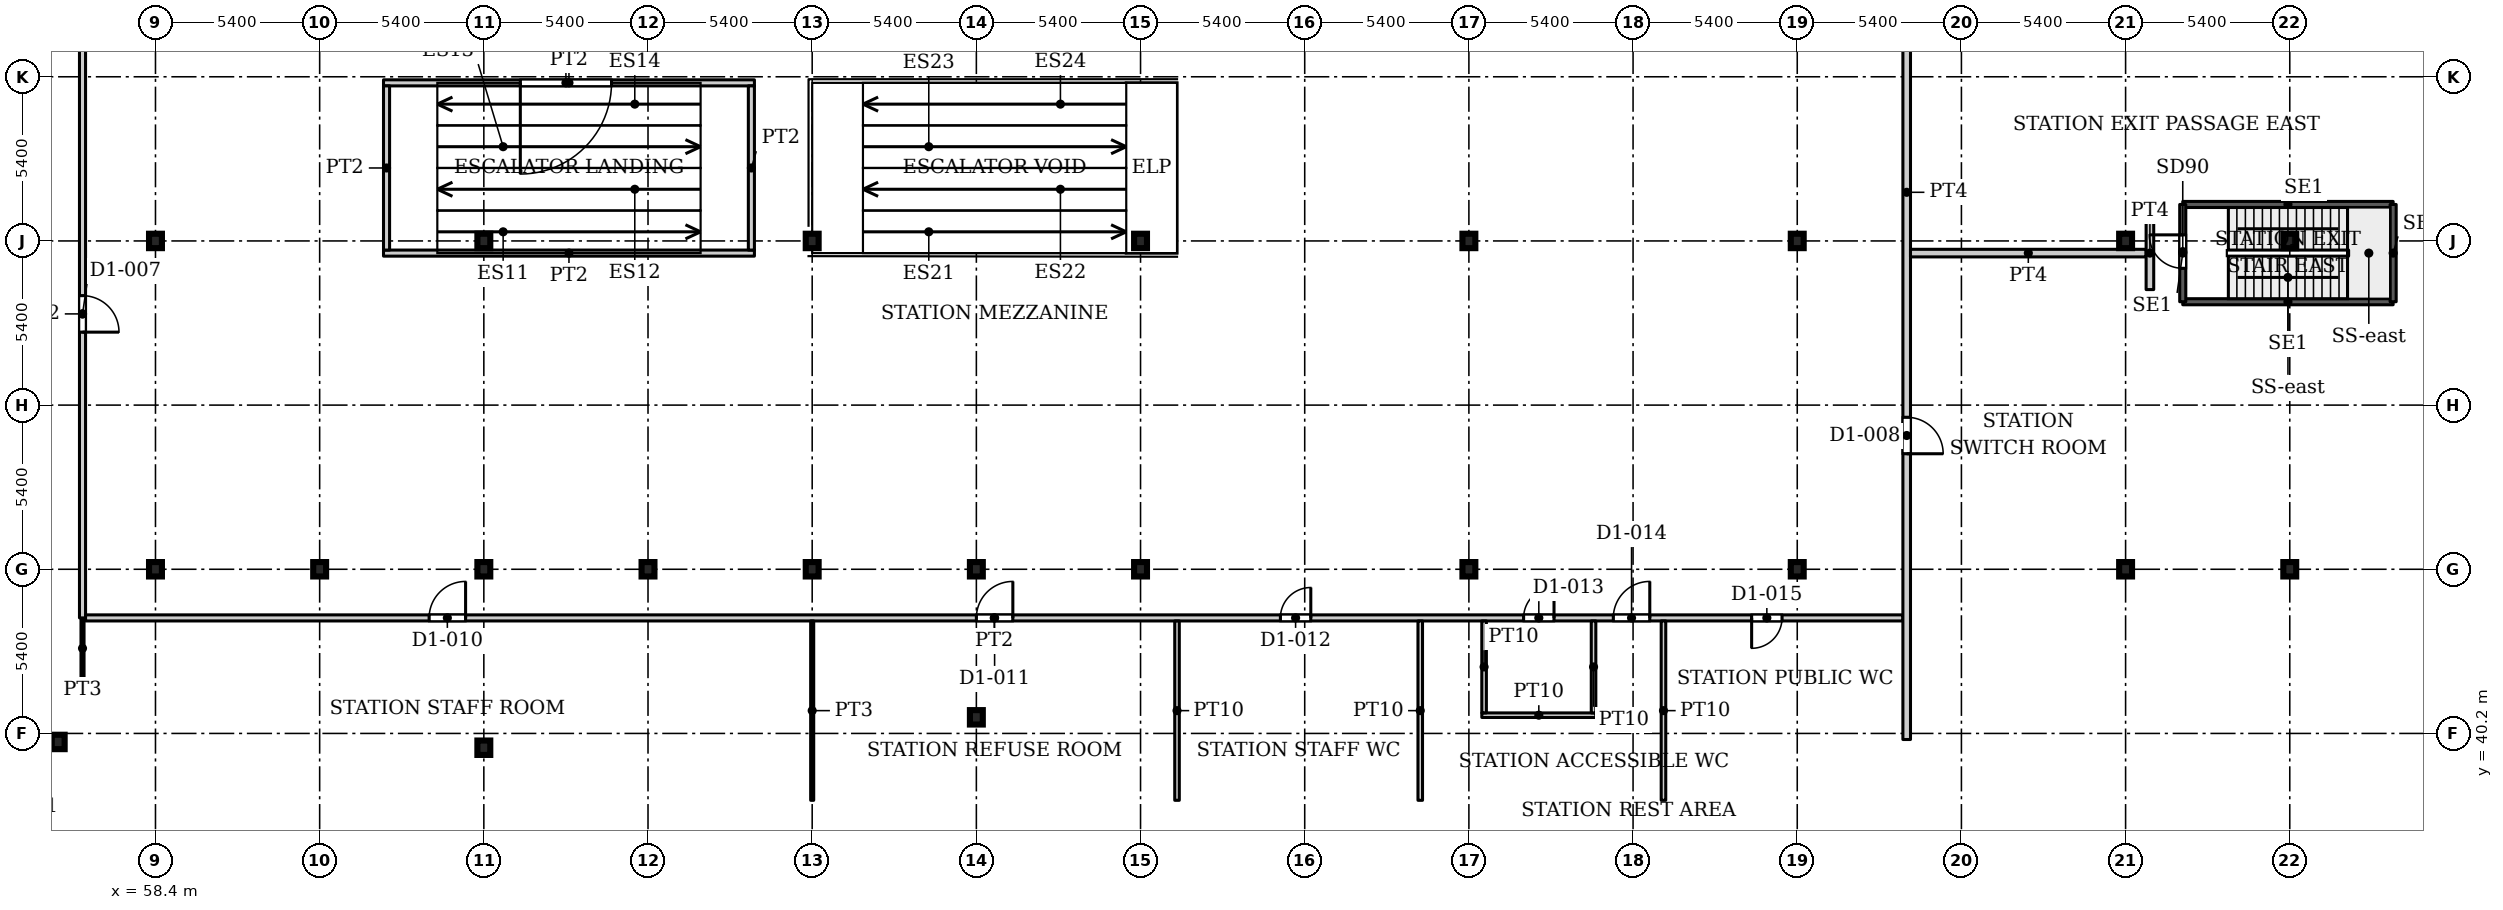
"""IFC4 building model, lengths in metres.
Left out: names, types, materials, properties, quantities, classifications, styles, units other than length and angle.
Written with IfcOpenShell. Run it as: python <this file> out.ifc"""

import sys

from ifc_helpers import new_model, si_unit, direction, frame, frame_2d, origin, origin_2d, place, context, subcontext, project, spatial, rectangle, i_section, extrude, source, transform, mapped, element, fill, save


model = new_model("IFC4")
c1 = context("Model", 3, precision=1e-05, world=origin(), true_north=direction((0.0, 1.0)))
c2 = subcontext(c1, "Body", "Model", "MODEL_VIEW")
j1 = project(units=[si_unit("LENGTHUNIT", "METRE"), si_unit("PLANEANGLEUNIT", "RADIAN")], contexts=[c1])
p1 = place(None, origin())
s1 = spatial("IfcSite", under=j1, at=p1, CompositionType="ELEMENT")
p2 = place(p1, origin())
s2 = spatial("IfcBuilding", under=s1, at=p2, CompositionType="ELEMENT")
p3 = place(p2, frame((0.0, 0.0, -5.0)))
s3 = spatial("IfcBuildingStorey", under=s2, at=p3, CompositionType="ELEMENT", Elevation=-5.0)
for number, where, z_axis, x_axis in (
    (1, (58.4, 45.6, 0.0), (0.0, 0.0, 1.0), (1.0, 0.0, 0.0)),
    (2, (69.2, 45.6, 0.0), (0.0, 0.0, 1.0), (1.0, 0.0, 0.0)),
    (3, (80.0, 45.6, 0.0), (0.0, 0.0, 1.0), (1.0, 0.0, 0.0)),
    (4, (90.8, 45.6, 0.0), (0.0, 0.0, 1.0), (1.0, 0.0, 0.0)),
    (5, (101.6, 45.6, 0.0), (0.0, 0.0, 1.0), (1.0, 0.0, 0.0)),
    (6, (112.4, 45.6, 0.0), (0.0, 0.0, 1.0), (1.0, 0.0, 0.0)),
    (7, (123.2, 45.6, 0.0), (0.0, 0.0, 1.0), (1.0, 0.0, 0.0)),
    (8, (128.6, 45.6, 0.0), (0.0, 0.0, 1.0), (1.0, 0.0, 0.0)),
    (9, (58.4, 56.4, 0.0), (0.0, 0.0, 1.0), (1.0, 0.0, 0.0)),
    (10, (69.2, 56.4, 0.0), (0.0, 0.0, 1.0), (1.0, 0.0, 0.0)),
    (11, (80.0, 56.4, 0.0), (0.0, 0.0, 1.0), (1.0, 0.0, 0.0)),
    (12, (90.8, 56.4, 0.0), (0.0, 0.0, 1.0), (1.0, 0.0, 0.0)),
    (13, (101.6, 56.4, 0.0), (0.0, 0.0, 1.0), (1.0, 0.0, 0.0)),
    (14, (112.4, 56.4, 0.0), (0.0, 0.0, 1.0), (1.0, 0.0, 0.0)),
    (15, (123.2, 56.4, 0.0), (0.0, 0.0, 1.0), (1.0, 0.0, 0.0)),
    (16, (128.6, 56.4, 0.0), (0.0, 0.0, 1.0), (1.0, 0.0, 0.0)),
    (17, (63.8, 45.6, 0.0), (0.0, 0.0, 1.0), (1.0, 0.0, 0.0)),
    (18, (74.6, 45.6, 0.0), (0.0, 0.0, 1.0), (1.0, 0.0, 0.0)),
    (19, (85.4, 45.6, 0.0), (0.0, 0.0, 1.0), (1.0, 0.0, 0.0)),
    (20, (69.2, 39.73, 0.0), (0.0, 0.0, 1.0), (1.0, 0.0, 0.0)),
    (21, (55.2, 39.92, 0.0), (0.0, 0.0, 1.0), (1.0, 0.0, 0.0)),
    (22, (85.4, 40.73, 0.0), (0.0, 0.0, 1.0), (1.0, 0.0, 0.0)),
):
    element("IfcColumn", number, at=place(p3, frame(where, z_axis=z_axis, x_axis=x_axis)), inside=s3, PredefinedType="COLUMN", context=c2, shape_type="SweptSolid", body=[
        extrude(i_section(OverallWidth=0.424, OverallDepth=0.474, WebThickness=0.048, FlangeThickness=0.077, FilletRadius=0.014, at=origin_2d()), origin(), (0.0, 0.0, 1.0), 5.0),
    ])
for number, where, z_axis, x_axis in (
    (23, (125.08, 54.4, 0.0), (0.0, 0.0, 1.0), (1.0, 0.0, 0.0)),
    (24, (125.08, 57.6, 0.0), (0.0, 0.0, 1.0), (1.0, 0.0, 0.0)),
):
    element("IfcWall", number, at=place(p3, frame(where, z_axis=z_axis, x_axis=x_axis)), inside=s3, PredefinedType="SHEAR", context=c2, shape_type="SweptSolid", body=[
        extrude(rectangle(XDim=6.92, YDim=0.2, at=frame_2d((3.46, 0.0))), origin(), (0.0, 0.0, 1.0), 5.0),
    ])
p4 = place(p3, frame((125.08, 54.4, 0.0), z_axis=(0.0, 0.0, 1.0), x_axis=(0.0, 1.0, 0.0)))
e25 = element("IfcWall", 25, at=p4, inside=s3, PredefinedType="SHEAR", context=c2, shape_type="SweptSolid", body=[
    extrude(rectangle(XDim=3.2, YDim=0.2, at=frame_2d((1.6, 0.0))), origin(), (0.0, 0.0, 1.0), 5.0),
])
p5 = place(p4, frame((1.1, 0.0, 0.0)))
e26 = element("IfcOpeningElement", 26, at=p5, cuts=e25, PredefinedType="OPENING", context=c2, shape_type="SweptSolid", body=[
    extrude(rectangle(XDim=1.1, YDim=2.2, at=frame_2d((0.55, 1.1))), frame((0.0, 0.11, 0.0), z_axis=(0.0, -1.0, 0.0), x_axis=(1.0, 0.0, 0.0)), (0.0, 0.0, 1.0), 0.22),
])
p6 = place(p3, frame((132.0, 54.4, 0.0), z_axis=(0.0, 0.0, 1.0), x_axis=(0.0, 1.0, 0.0)))
e27 = element("IfcWall", 27, at=p6, inside=s3, PredefinedType="SHEAR", context=c2, shape_type="SweptSolid", body=[
    extrude(rectangle(XDim=3.2, YDim=0.2, at=frame_2d((1.6, 0.0))), origin(), (0.0, 0.0, 1.0), 5.0),
])
p7 = place(p3, frame((56.0, 42.0, 0.0), z_axis=(0.0, 0.0, 1.0), x_axis=(0.0, 1.0, 0.0)))
e28 = element("IfcWall", 28, at=p7, inside=s3, PredefinedType="PARTITIONING", context=c2, shape_type="SweptSolid", body=[
    extrude(rectangle(XDim=2.0, YDim=0.1, at=frame_2d((1.0, 0.0))), origin(), (0.0, 0.0, 1.0), 4.58),
])
p8 = place(p3, frame((56.0, 44.0, 0.0), z_axis=(0.0, 0.0, 1.0), x_axis=(0.0, 1.0, 0.0)))
e29 = element("IfcWall", 29, at=p8, inside=s3, PredefinedType="PARTITIONING", context=c2, shape_type="SweptSolid", body=[
    extrude(rectangle(XDim=20.0, YDim=0.2, at=frame_2d((10.0, 0.0))), origin(), (0.0, 0.0, 1.0), 4.58),
])
p9 = place(p8, frame((9.4, 0.0, 0.0)))
e30 = element("IfcOpeningElement", 30, at=p9, cuts=e29, PredefinedType="OPENING", context=c2, shape_type="SweptSolid", body=[
    extrude(rectangle(XDim=1.2, YDim=2.1, at=frame_2d((0.6, 1.05))), frame((0.0, 0.11, 0.0), z_axis=(0.0, -1.0, 0.0), x_axis=(1.0, 0.0, 0.0)), (0.0, 0.0, 1.0), 0.22),
])
p10 = place(p3, frame((56.1, 44.0, 0.0), z_axis=(0.0, 0.0, 1.0), x_axis=(1.0, 0.0, 0.0)))
e31 = element("IfcWall", 31, at=p10, inside=s3, PredefinedType="PARTITIONING", context=c2, shape_type="SweptSolid", body=[
    extrude(rectangle(XDim=59.775, YDim=0.2, at=frame_2d((29.887, 0.0))), origin(), (0.0, 0.0, 1.0), 4.58),
])
p11 = place(p10, frame((11.3, 0.0, 0.0)))
e32 = element("IfcOpeningElement", 32, at=p11, cuts=e31, PredefinedType="OPENING", context=c2, shape_type="SweptSolid", body=[
    extrude(rectangle(XDim=1.2, YDim=2.1, at=frame_2d((0.6, 1.05))), frame((0.0, 0.11, 0.0), z_axis=(0.0, -1.0, 0.0), x_axis=(1.0, 0.0, 0.0)), (0.0, 0.0, 1.0), 0.22),
])
p12 = place(p10, frame((29.3, 0.0, 0.0)))
e33 = element("IfcOpeningElement", 33, at=p12, cuts=e31, PredefinedType="OPENING", context=c2, shape_type="SweptSolid", body=[
    extrude(rectangle(XDim=1.2, YDim=2.1, at=frame_2d((0.6, 1.05))), frame((0.0, 0.11, 0.0), z_axis=(0.0, -1.0, 0.0), x_axis=(1.0, 0.0, 0.0)), (0.0, 0.0, 1.0), 0.22),
])
p13 = place(p10, frame((39.3, 0.0, 0.0)))
e34 = element("IfcOpeningElement", 34, at=p13, cuts=e31, PredefinedType="OPENING", context=c2, shape_type="SweptSolid", body=[
    extrude(rectangle(XDim=1.0, YDim=2.1, at=frame_2d((0.5, 1.05))), frame((0.0, 0.11, 0.0), z_axis=(0.0, -1.0, 0.0), x_axis=(1.0, 0.0, 0.0)), (0.0, 0.0, 1.0), 0.22),
])
p14 = place(p10, frame((47.3, 0.0, 0.0)))
e35 = element("IfcOpeningElement", 35, at=p14, cuts=e31, PredefinedType="OPENING", context=c2, shape_type="SweptSolid", body=[
    extrude(rectangle(XDim=1.0, YDim=2.1, at=frame_2d((0.5, 1.05))), frame((0.0, 0.11, 0.0), z_axis=(0.0, -1.0, 0.0), x_axis=(1.0, 0.0, 0.0)), (0.0, 0.0, 1.0), 0.22),
])
p15 = place(p10, frame((50.25, 0.0, 0.0)))
e36 = element("IfcOpeningElement", 36, at=p15, cuts=e31, PredefinedType="OPENING", context=c2, shape_type="SweptSolid", body=[
    extrude(rectangle(XDim=1.2, YDim=2.1, at=frame_2d((0.6, 1.05))), frame((0.0, 0.11, 0.0), z_axis=(0.0, -1.0, 0.0), x_axis=(1.0, 0.0, 0.0)), (0.0, 0.0, 1.0), 0.22),
])
p16 = place(p10, frame((54.8, 0.0, 0.0)))
e37 = element("IfcOpeningElement", 37, at=p16, cuts=e31, PredefinedType="OPENING", context=c2, shape_type="SweptSolid", body=[
    extrude(rectangle(XDim=1.0, YDim=2.1, at=frame_2d((0.5, 1.05))), frame((0.0, 0.11, 0.0), z_axis=(0.0, -1.0, 0.0), x_axis=(1.0, 0.0, 0.0)), (0.0, 0.0, 1.0), 0.22),
])
p17 = place(p3, frame((65.9, 56.0, 0.0), z_axis=(0.0, 0.0, 1.0), x_axis=(1.0, 0.0, 0.0)))
e38 = element("IfcWall", 38, at=p17, inside=s3, PredefinedType="PARTITIONING", context=c2, shape_type="SweptSolid", body=[
    extrude(rectangle(XDim=12.2, YDim=0.2, at=frame_2d((6.1, 0.0))), origin(), (0.0, 0.0, 1.0), 4.58),
])
p18 = place(p3, frame((65.9, 61.6, 0.0), z_axis=(0.0, 0.0, 1.0), x_axis=(1.0, 0.0, 0.0)))
e39 = element("IfcWall", 39, at=p18, inside=s3, PredefinedType="PARTITIONING", context=c2, shape_type="SweptSolid", body=[
    extrude(rectangle(XDim=12.2, YDim=0.2, at=frame_2d((6.1, 0.0))), origin(), (0.0, 0.0, 1.0), 4.58),
])
p19 = place(p18, frame((4.5, 0.0, 0.0)))
e40 = element("IfcOpeningElement", 40, at=p19, cuts=e39, PredefinedType="OPENING", context=c2, shape_type="SweptSolid", body=[
    extrude(rectangle(XDim=3.0, YDim=2.1, at=frame_2d((1.5, 1.05))), frame((0.0, 0.11, 0.0), z_axis=(0.0, -1.0, 0.0), x_axis=(1.0, 0.0, 0.0)), (0.0, 0.0, 1.0), 0.22),
])
for number, where, z_axis, x_axis in (
    (41, (66.0, 56.1, 0.0), (0.0, 0.0, 1.0), (0.0, 1.0, 0.0)),
    (42, (78.0, 56.1, 0.0), (0.0, 0.0, 1.0), (0.0, 1.0, 0.0)),
):
    element("IfcWall", number, at=place(p3, frame(where, z_axis=z_axis, x_axis=x_axis)), inside=s3, PredefinedType="PARTITIONING", context=c2, shape_type="SweptSolid", body=[
        extrude(rectangle(XDim=5.4, YDim=0.2, at=frame_2d((2.7, 0.0))), origin(), (0.0, 0.0, 1.0), 4.58),
    ])
p20 = place(p3, frame((80.0, 38.0, 0.0), z_axis=(0.0, 0.0, 1.0), x_axis=(0.0, 1.0, 0.0)))
e43 = element("IfcWall", 43, at=p20, inside=s3, PredefinedType="PARTITIONING", context=c2, shape_type="SweptSolid", body=[
    extrude(rectangle(XDim=5.9, YDim=0.1, at=frame_2d((2.95, 0.0))), origin(), (0.0, 0.0, 1.0), 4.58),
])
for number, where, z_axis, x_axis in (
    (44, (92.0, 38.0, 0.0), (0.0, 0.0, 1.0), (0.0, 1.0, 0.0)),
    (45, (100.0, 38.0, 0.0), (0.0, 0.0, 1.0), (0.0, 1.0, 0.0)),
):
    element("IfcWall", number, at=place(p3, frame(where, z_axis=z_axis, x_axis=x_axis)), inside=s3, PredefinedType="PARTITIONING", context=c2, shape_type="SweptSolid", body=[
        extrude(rectangle(XDim=5.9, YDim=0.15, at=frame_2d((2.95, 0.0))), origin(), (0.0, 0.0, 1.0), 4.58),
    ])
p21 = place(p3, frame((102.025, 40.8, 0.0), z_axis=(0.0, 0.0, 1.0), x_axis=(1.0, 0.0, 0.0)))
e46 = element("IfcWall", 46, at=p21, inside=s3, PredefinedType="PARTITIONING", context=c2, shape_type="SweptSolid", body=[
    extrude(rectangle(XDim=3.75, YDim=0.15, at=frame_2d((1.875, 0.0))), origin(), (0.0, 0.0, 1.0), 4.58),
])
for number, where, z_axis, x_axis in (
    (47, (102.1, 40.875, 0.0), (0.0, 0.0, 1.0), (0.0, 1.0, 0.0)),
    (48, (105.7, 40.875, 0.0), (0.0, 0.0, 1.0), (0.0, 1.0, 0.0)),
):
    element("IfcWall", number, at=place(p3, frame(where, z_axis=z_axis, x_axis=x_axis)), inside=s3, PredefinedType="PARTITIONING", context=c2, shape_type="SweptSolid", body=[
        extrude(rectangle(XDim=3.025, YDim=0.15, at=frame_2d((1.512, 0.0))), origin(), (0.0, 0.0, 1.0), 4.58),
    ])
p22 = place(p3, frame((108.0, 38.0, 0.0), z_axis=(0.0, 0.0, 1.0), x_axis=(0.0, 1.0, 0.0)))
e49 = element("IfcWall", 49, at=p22, inside=s3, PredefinedType="PARTITIONING", context=c2, shape_type="SweptSolid", body=[
    extrude(rectangle(XDim=5.9, YDim=0.15, at=frame_2d((2.95, 0.0))), origin(), (0.0, 0.0, 1.0), 4.58),
])
p23 = place(p3, frame((116.0, 40.0, 0.0), z_axis=(0.0, 0.0, 1.0), x_axis=(0.0, 1.0, 0.0)))
e50 = element("IfcWall", 50, at=p23, inside=s3, PredefinedType="PARTITIONING", context=c2, shape_type="SweptSolid", body=[
    extrude(rectangle(XDim=36.0, YDim=0.25, at=frame_2d((18.0, 0.0))), origin(), (0.0, 0.0, 1.0), 4.58),
])
p24 = place(p23, frame((9.4, 0.0, 0.0)))
e51 = element("IfcOpeningElement", 51, at=p24, cuts=e50, PredefinedType="OPENING", context=c2, shape_type="SweptSolid", body=[
    extrude(rectangle(XDim=1.2, YDim=2.1, at=frame_2d((0.6, 1.05))), frame((0.0, 0.135, 0.0), z_axis=(0.0, -1.0, 0.0), x_axis=(1.0, 0.0, 0.0)), (0.0, 0.0, 1.0), 0.27),
])
p25 = place(p23, frame((25.4, 0.0, 0.0)))
e52 = element("IfcOpeningElement", 52, at=p25, cuts=e50, PredefinedType="OPENING", context=c2, shape_type="SweptSolid", body=[
    extrude(rectangle(XDim=1.2, YDim=2.1, at=frame_2d((0.6, 1.05))), frame((0.0, 0.135, 0.0), z_axis=(0.0, -1.0, 0.0), x_axis=(1.0, 0.0, 0.0)), (0.0, 0.0, 1.0), 0.27),
])
p26 = place(p3, frame((116.125, 56.0, 0.0), z_axis=(0.0, 0.0, 1.0), x_axis=(1.0, 0.0, 0.0)))
e53 = element("IfcWall", 53, at=p26, inside=s3, PredefinedType="PARTITIONING", context=c2, shape_type="SweptSolid", body=[
    extrude(rectangle(XDim=7.75, YDim=0.25, at=frame_2d((3.875, 0.0))), origin(), (0.0, 0.0, 1.0), 4.58),
])
p27 = place(p3, frame((124.0, 54.8, 0.0), z_axis=(0.0, 0.0, 1.0), x_axis=(0.0, 1.0, 0.0)))
e54 = element("IfcWall", 54, at=p27, inside=s3, PredefinedType="PARTITIONING", context=c2, shape_type="SweptSolid", body=[
    extrude(rectangle(XDim=2.4, YDim=0.25, at=frame_2d((1.2, 0.0))), origin(), (0.0, 0.0, 1.0), 4.58),
])
m1 = source(origin(), c2, "Body", "SweptSolid", [
    extrude(rectangle(XDim=1.1, YDim=2.2, at=frame_2d((0.55, 1.1))), frame((0.0, 0.025, 0.0), z_axis=(0.0, -1.0, 0.0), x_axis=(1.0, 0.0, 0.0)), (0.0, 0.0, 1.0), 0.05),
])
p28 = place(p5, origin())
e55 = element("IfcDoor", 55, at=p28, inside=s3, OperationType="SINGLE_SWING_LEFT", PredefinedType="DOOR", context=c2, shape_type="MappedRepresentation", body=[
    mapped(m1, transform((0.0, 0.0, 0.0), x_axis=(1.0, 0.0, 0.0), y_axis=(0.0, 1.0, 0.0), z_axis=(0.0, 0.0, 1.0), scale=1.0)),
])
fill(e26, e55)
m2 = source(origin(), c2, "Body", "SweptSolid", [
    extrude(rectangle(XDim=3.0, YDim=2.1, at=frame_2d((1.5, 1.05))), frame((0.0, 0.025, 0.0), z_axis=(0.0, -1.0, 0.0), x_axis=(1.0, 0.0, 0.0)), (0.0, 0.0, 1.0), 0.05),
])
p29 = place(p19, origin())
e56 = element("IfcDoor", 56, at=p29, inside=s3, OperationType="DOUBLE_DOOR_SINGLE_SWING", PredefinedType="DOOR", context=c2, shape_type="MappedRepresentation", body=[
    mapped(m2, transform((0.0, 0.0, 0.0), x_axis=(1.0, 0.0, 0.0), y_axis=(0.0, 1.0, 0.0), z_axis=(0.0, 0.0, 1.0), scale=1.0)),
])
fill(e40, e56)
m3 = source(origin(), c2, "Body", "SweptSolid", [
    extrude(rectangle(XDim=1.2, YDim=2.1, at=frame_2d((0.6, 1.05))), frame((0.0, 0.025, 0.0), z_axis=(0.0, -1.0, 0.0), x_axis=(1.0, 0.0, 0.0)), (0.0, 0.0, 1.0), 0.05),
])
p30 = place(p9, origin())
e57 = element("IfcDoor", 57, at=p30, inside=s3, OperationType="SINGLE_SWING_RIGHT", PredefinedType="DOOR", context=c2, shape_type="MappedRepresentation", body=[
    mapped(m3, transform((0.0, 0.0, 0.0), x_axis=(1.0, 0.0, 0.0), y_axis=(0.0, 1.0, 0.0), z_axis=(0.0, 0.0, 1.0), scale=1.0)),
])
fill(e30, e57)
m4 = source(origin(), c2, "Body", "SweptSolid", [
    extrude(rectangle(XDim=1.2, YDim=2.1, at=frame_2d((0.6, 1.05))), frame((0.0, 0.025, 0.0), z_axis=(0.0, -1.0, 0.0), x_axis=(1.0, 0.0, 0.0)), (0.0, 0.0, 1.0), 0.05),
])
p31 = place(p24, origin())
e58 = element("IfcDoor", 58, at=p31, inside=s3, OperationType="SINGLE_SWING_RIGHT", PredefinedType="DOOR", context=c2, shape_type="MappedRepresentation", body=[
    mapped(m4, transform((0.0, 0.0, 0.0), x_axis=(1.0, 0.0, 0.0), y_axis=(0.0, 1.0, 0.0), z_axis=(0.0, 0.0, 1.0), scale=1.0)),
])
fill(e51, e58)
p32 = place(p11, origin())
e59 = element("IfcDoor", 59, at=p32, inside=s3, OperationType="SINGLE_SWING_LEFT", PredefinedType="DOOR", context=c2, shape_type="MappedRepresentation", body=[
    mapped(m3, transform((0.0, 0.0, 0.0), x_axis=(1.0, 0.0, 0.0), y_axis=(0.0, 1.0, 0.0), z_axis=(0.0, 0.0, 1.0), scale=1.0)),
])
fill(e32, e59)
p33 = place(p12, origin())
e60 = element("IfcDoor", 60, at=p33, inside=s3, OperationType="SINGLE_SWING_LEFT", PredefinedType="DOOR", context=c2, shape_type="MappedRepresentation", body=[
    mapped(m3, transform((0.0, 0.0, 0.0), x_axis=(1.0, 0.0, 0.0), y_axis=(0.0, 1.0, 0.0), z_axis=(0.0, 0.0, 1.0), scale=1.0)),
])
fill(e33, e60)
m5 = source(origin(), c2, "Body", "SweptSolid", [
    extrude(rectangle(XDim=1.0, YDim=2.1, at=frame_2d((0.5, 1.05))), frame((0.0, 0.025, 0.0), z_axis=(0.0, -1.0, 0.0), x_axis=(1.0, 0.0, 0.0)), (0.0, 0.0, 1.0), 0.05),
])
p34 = place(p13, origin())
e61 = element("IfcDoor", 61, at=p34, inside=s3, OperationType="SINGLE_SWING_LEFT", PredefinedType="DOOR", context=c2, shape_type="MappedRepresentation", body=[
    mapped(m5, transform((0.0, 0.0, 0.0), x_axis=(1.0, 0.0, 0.0), y_axis=(0.0, 1.0, 0.0), z_axis=(0.0, 0.0, 1.0), scale=1.0)),
])
fill(e34, e61)
p35 = place(p14, origin())
e62 = element("IfcDoor", 62, at=p35, inside=s3, OperationType="SINGLE_SWING_LEFT", PredefinedType="DOOR", context=c2, shape_type="MappedRepresentation", body=[
    mapped(m5, transform((0.0, 0.0, 0.0), x_axis=(1.0, 0.0, 0.0), y_axis=(0.0, 1.0, 0.0), z_axis=(0.0, 0.0, 1.0), scale=1.0)),
])
fill(e35, e62)
p36 = place(p15, origin())
e63 = element("IfcDoor", 63, at=p36, inside=s3, OperationType="SINGLE_SWING_LEFT", PredefinedType="DOOR", context=c2, shape_type="MappedRepresentation", body=[
    mapped(m3, transform((0.0, 0.0, 0.0), x_axis=(1.0, 0.0, 0.0), y_axis=(0.0, 1.0, 0.0), z_axis=(0.0, 0.0, 1.0), scale=1.0)),
])
fill(e36, e63)
p37 = place(p16, origin())
e64 = element("IfcDoor", 64, at=p37, inside=s3, OperationType="SINGLE_SWING_RIGHT", PredefinedType="DOOR", context=c2, shape_type="MappedRepresentation", body=[
    mapped(m5, transform((0.0, 0.0, 0.0), x_axis=(1.0, 0.0, 0.0), y_axis=(0.0, 1.0, 0.0), z_axis=(0.0, 0.0, 1.0), scale=1.0)),
])
fill(e37, e64)
save(model, sys.argv[1])
